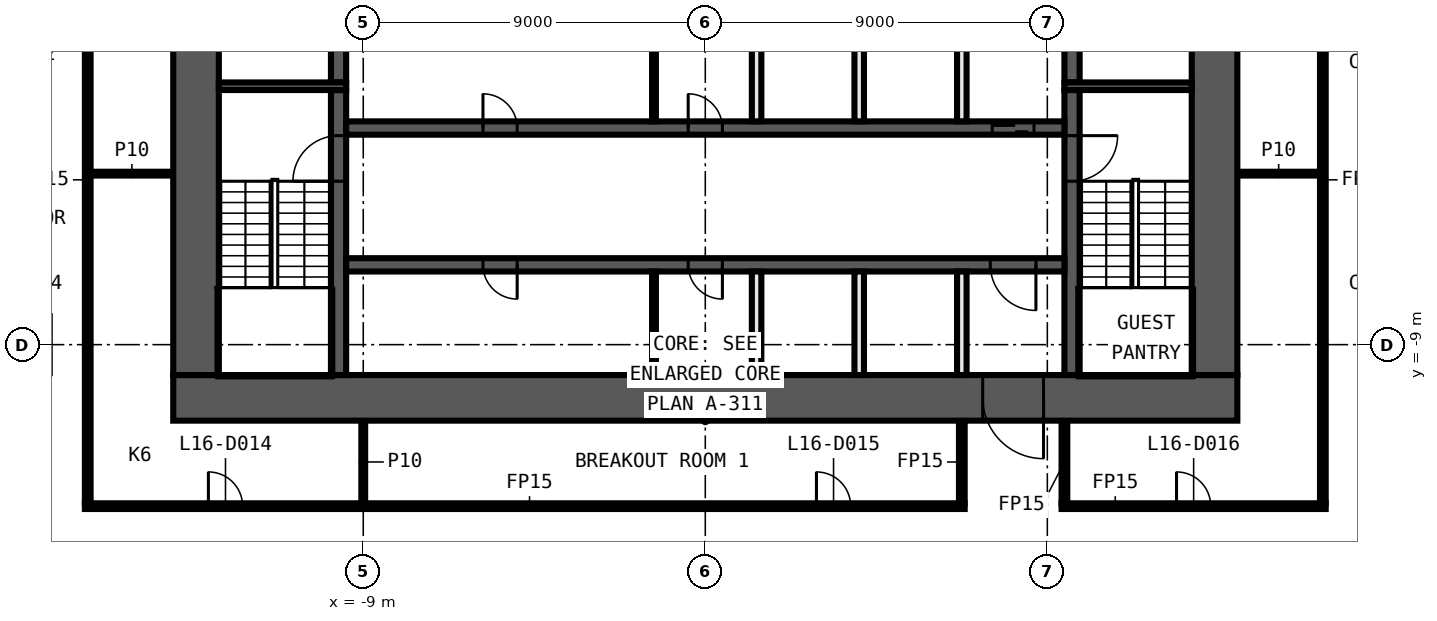
"""IFC4 building model, lengths in metres.
Left out: names, types, materials, properties, quantities, classifications, styles, units other than length and angle.
Written with IfcOpenShell. Run it as: python <this file> out.ifc"""

import sys

from ifc_helpers import new_model, si_unit, direction, frame, frame_2d, origin, place, context, subcontext, project, spatial, rectangle, extrude, element, fill, save


model = new_model("IFC4")
c1 = context("Model", 3, precision=1e-05, world=origin(), true_north=direction((0.0, 1.0)))
c2 = subcontext(c1, "Body", "Model", "MODEL_VIEW")
j1 = project(units=[si_unit("LENGTHUNIT", "METRE"), si_unit("PLANEANGLEUNIT", "RADIAN")], contexts=[c1])
p1 = place(None, origin())
s1 = spatial("IfcSite", under=j1, at=p1, CompositionType="ELEMENT")
p2 = place(p1, origin())
s2 = spatial("IfcBuilding", under=s1, at=p2, CompositionType="ELEMENT")
p3 = place(p2, frame((0.0, 0.0, 81.0)))
s3 = spatial("IfcBuildingStorey", under=s2, at=p3, CompositionType="ELEMENT", Elevation=81.0)
p4 = place(p3, frame((-16.325, -13.25, 0.0), z_axis=(0.0, 0.0, 1.0), x_axis=(1.0, 0.0, 0.0)))
e1 = element("IfcWall", 1, at=p4, inside=s3, PredefinedType="PARTITIONING", context=c2, shape_type="SweptSolid", body=[
    extrude(rectangle(XDim=23.15, YDim=0.15, at=frame_2d((11.575, 0.0))), origin(), (0.0, 0.0, 1.0), 3.3),
])
p5 = place(p4, frame((3.25, 0.0, 0.0)))
e2 = element("IfcOpeningElement", 2, at=p5, cuts=e1, PredefinedType="OPENING", context=c2, shape_type="SweptSolid", body=[
    extrude(rectangle(XDim=0.9, YDim=2.1, at=frame_2d((0.45, 1.05))), frame((0.0, 0.085, 0.0), z_axis=(0.0, -1.0, 0.0), x_axis=(1.0, 0.0, 0.0)), (0.0, 0.0, 1.0), 0.17),
])
p6 = place(p4, frame((19.25, 0.0, 0.0)))
e3 = element("IfcOpeningElement", 3, at=p6, cuts=e1, PredefinedType="OPENING", context=c2, shape_type="SweptSolid", body=[
    extrude(rectangle(XDim=0.9, YDim=2.1, at=frame_2d((0.45, 1.05))), frame((0.0, 0.085, 0.0), z_axis=(0.0, -1.0, 0.0), x_axis=(1.0, 0.0, 0.0)), (0.0, 0.0, 1.0), 0.17),
])
p7 = place(p3, frame((9.375, -13.25, 0.0), z_axis=(0.0, 0.0, 1.0), x_axis=(1.0, 0.0, 0.0)))
e4 = element("IfcWall", 4, at=p7, inside=s3, PredefinedType="PARTITIONING", context=c2, shape_type="SweptSolid", body=[
    extrude(rectangle(XDim=6.95, YDim=0.15, at=frame_2d((3.475, 0.0))), origin(), (0.0, 0.0, 1.0), 3.3),
])
p8 = place(p7, frame((3.025, 0.0, 0.0)))
e5 = element("IfcOpeningElement", 5, at=p8, cuts=e4, PredefinedType="OPENING", context=c2, shape_type="SweptSolid", body=[
    extrude(rectangle(XDim=0.9, YDim=2.1, at=frame_2d((0.45, 1.05))), frame((0.0, 0.085, 0.0), z_axis=(0.0, -1.0, 0.0), x_axis=(1.0, 0.0, 0.0)), (0.0, 0.0, 1.0), 0.17),
])
for number, where, z_axis, x_axis in (
    (6, (-16.175, -4.5, 0.0), (0.0, 0.0, 1.0), (1.0, 0.0, 0.0)),
    (7, (14.0, -4.5, 0.0), (0.0, 0.0, 1.0), (1.0, 0.0, 0.0)),
):
    element("IfcWall", number, at=place(p3, frame(where, z_axis=z_axis, x_axis=x_axis)), inside=s3, PredefinedType="PARTITIONING", context=c2, shape_type="SweptSolid", body=[
        extrude(rectangle(XDim=2.175, YDim=0.1, at=frame_2d((1.087, 0.0))), origin(), (0.0, 0.0, 1.0), 3.3),
    ])
p9 = place(p3, frame((16.25, -13.175, 0.0), z_axis=(0.0, 0.0, 1.0), x_axis=(0.0, 1.0, 0.0)))
e8 = element("IfcWall", 8, at=p9, inside=s3, PredefinedType="PARTITIONING", context=c2, shape_type="SweptSolid", body=[
    extrude(rectangle(XDim=26.35, YDim=0.15, at=frame_2d((13.175, 0.0))), origin(), (0.0, 0.0, 1.0), 3.3),
])
p10 = place(p9, frame((17.225, 0.0, 0.0)))
e9 = element("IfcOpeningElement", 9, at=p10, cuts=e8, PredefinedType="OPENING", context=c2, shape_type="SweptSolid", body=[
    extrude(rectangle(XDim=0.9, YDim=2.1, at=frame_2d((0.45, 1.05))), frame((0.0, 0.085, 0.0), z_axis=(0.0, -1.0, 0.0), x_axis=(1.0, 0.0, 0.0)), (0.0, 0.0, 1.0), 0.17),
])
for number, where, z_axis, x_axis in (
    (10, (9.45, -13.175, 0.0), (0.0, 0.0, 1.0), (0.0, 1.0, 0.0)),
    (11, (6.75, -13.175, 0.0), (0.0, 0.0, 1.0), (0.0, 1.0, 0.0)),
):
    element("IfcWall", number, at=place(p3, frame(where, z_axis=z_axis, x_axis=x_axis)), inside=s3, PredefinedType="PARTITIONING", context=c2, shape_type="SweptSolid", body=[
        extrude(rectangle(XDim=2.175, YDim=0.15, at=frame_2d((1.087, 0.0))), origin(), (0.0, 0.0, 1.0), 3.3),
    ])
p11 = place(p3, frame((-9.0, -13.175, 0.0), z_axis=(0.0, 0.0, 1.0), x_axis=(0.0, 1.0, 0.0)))
e12 = element("IfcWall", 12, at=p11, inside=s3, PredefinedType="PARTITIONING", context=c2, shape_type="SweptSolid", body=[
    extrude(rectangle(XDim=2.175, YDim=0.1, at=frame_2d((1.087, 0.0))), origin(), (0.0, 0.0, 1.0), 3.3),
])
p12 = place(p3, frame((-16.25, 13.175, 0.0), z_axis=(0.0, 0.0, 1.0), x_axis=(0.0, -1.0, 0.0)))
e13 = element("IfcWall", 13, at=p12, inside=s3, PredefinedType="PARTITIONING", context=c2, shape_type="SweptSolid", body=[
    extrude(rectangle(XDim=26.35, YDim=0.15, at=frame_2d((13.175, 0.0))), origin(), (0.0, 0.0, 1.0), 3.3),
])
p13 = place(p12, frame((8.225, 0.0, 0.0)))
e14 = element("IfcOpeningElement", 14, at=p13, cuts=e13, PredefinedType="OPENING", context=c2, shape_type="SweptSolid", body=[
    extrude(rectangle(XDim=0.9, YDim=2.1, at=frame_2d((0.45, 1.05))), frame((0.0, 0.085, 0.0), z_axis=(0.0, -1.0, 0.0), x_axis=(1.0, 0.0, 0.0)), (0.0, 0.0, 1.0), 0.17),
])
p14 = place(p3, frame((14.0, -10.4, 0.0), z_axis=(0.0, 0.0, 1.0), x_axis=(-1.0, 0.0, 0.0)))
e15 = element("IfcWall", 15, at=p14, inside=s3, PredefinedType="SHEAR", context=c2, shape_type="SweptSolid", body=[
    extrude(rectangle(XDim=28.0, YDim=1.2, at=frame_2d((14.0, 0.0))), origin(), (0.0, 0.0, 1.0), 3.3),
])
p15 = place(p14, frame((5.1, 0.0, 0.0)))
e16 = element("IfcOpeningElement", 16, at=p15, cuts=e15, PredefinedType="OPENING", context=c2, shape_type="SweptSolid", body=[
    extrude(rectangle(XDim=1.6, YDim=2.1, at=frame_2d((0.8, 1.05))), frame((0.0, 0.61, 0.0), z_axis=(0.0, -1.0, 0.0), x_axis=(1.0, 0.0, 0.0)), (0.0, 0.0, 1.0), 1.22),
])
for number, where, z_axis, x_axis in (
    (17, (13.4, 9.8, 0.0), (0.0, 0.0, 1.0), (0.0, -1.0, 0.0)),
    (18, (-13.4, -9.8, 0.0), (0.0, 0.0, 1.0), (0.0, 1.0, 0.0)),
):
    element("IfcWall", number, at=place(p3, frame(where, z_axis=z_axis, x_axis=x_axis)), inside=s3, PredefinedType="SHEAR", context=c2, shape_type="SweptSolid", body=[
        extrude(rectangle(XDim=19.6, YDim=1.2, at=frame_2d((9.8, 0.0))), origin(), (0.0, 0.0, 1.0), 3.3),
    ])
p16 = place(p3, frame((9.65, -2.3, 0.0), z_axis=(0.0, 0.0, 1.0), x_axis=(0.0, -1.0, 0.0)))
e19 = element("IfcWall", 19, at=p16, inside=s3, PredefinedType="SHEAR", context=c2, shape_type="SweptSolid", body=[
    extrude(rectangle(XDim=7.5, YDim=0.4, at=frame_2d((3.75, 0.0))), origin(), (0.0, 0.0, 1.0), 3.3),
])
p17 = place(p16, frame((1.2, 0.0, 0.0)))
e20 = element("IfcOpeningElement", 20, at=p17, cuts=e19, PredefinedType="OPENING", context=c2, shape_type="SweptSolid", body=[
    extrude(rectangle(XDim=1.2, YDim=2.1, at=frame_2d((0.6, 1.05))), frame((0.0, 0.21, 0.0), z_axis=(0.0, -1.0, 0.0), x_axis=(1.0, 0.0, 0.0)), (0.0, 0.0, 1.0), 0.42),
])
p18 = place(p3, frame((9.65, 2.1, 0.0), z_axis=(0.0, 0.0, 1.0), x_axis=(0.0, -1.0, 0.0)))
e21 = element("IfcWall", 21, at=p18, inside=s3, PredefinedType="SHEAR", context=c2, shape_type="SweptSolid", body=[
    extrude(rectangle(XDim=4.2, YDim=0.4, at=frame_2d((2.1, 0.0))), origin(), (0.0, 0.0, 1.0), 3.3),
])
p19 = place(p18, frame((0.15, 0.0, 0.0)))
e22 = element("IfcOpeningElement", 22, at=p19, cuts=e21, PredefinedType="OPENING", context=c2, shape_type="SweptSolid", body=[
    extrude(rectangle(XDim=0.9, YDim=2.1, at=frame_2d((0.45, 1.05))), frame((0.0, 0.21, 0.0), z_axis=(0.0, -1.0, 0.0), x_axis=(1.0, 0.0, 0.0)), (0.0, 0.0, 1.0), 0.42),
])
p20 = place(p3, frame((-9.65, -9.8, 0.0), z_axis=(0.0, 0.0, 1.0), x_axis=(0.0, 1.0, 0.0)))
e23 = element("IfcWall", 23, at=p20, inside=s3, PredefinedType="SHEAR", context=c2, shape_type="SweptSolid", body=[
    extrude(rectangle(XDim=7.5, YDim=0.4, at=frame_2d((3.75, 0.0))), origin(), (0.0, 0.0, 1.0), 3.3),
])
p21 = place(p20, frame((5.1, 0.0, 0.0)))
e24 = element("IfcOpeningElement", 24, at=p21, cuts=e23, PredefinedType="OPENING", context=c2, shape_type="SweptSolid", body=[
    extrude(rectangle(XDim=1.2, YDim=2.1, at=frame_2d((0.6, 1.05))), frame((0.0, 0.21, 0.0), z_axis=(0.0, -1.0, 0.0), x_axis=(1.0, 0.0, 0.0)), (0.0, 0.0, 1.0), 0.42),
])
p22 = place(p3, frame((-9.65, -2.1, 0.0), z_axis=(0.0, 0.0, 1.0), x_axis=(0.0, 1.0, 0.0)))
e25 = element("IfcWall", 25, at=p22, inside=s3, PredefinedType="SHEAR", context=c2, shape_type="SweptSolid", body=[
    extrude(rectangle(XDim=4.2, YDim=0.4, at=frame_2d((2.1, 0.0))), origin(), (0.0, 0.0, 1.0), 3.3),
])
for number, where, z_axis, x_axis in (
    (26, (9.45, -2.2, 0.0), (0.0, 0.0, 1.0), (1.0, 0.0, 0.0)),
    (27, (-9.45, -2.2, 0.0), (0.0, 0.0, 1.0), (-1.0, 0.0, 0.0)),
):
    element("IfcWall", number, at=place(p3, frame(where, z_axis=z_axis, x_axis=x_axis)), inside=s3, PredefinedType="SHEAR", context=c2, shape_type="SweptSolid", body=[
        extrude(rectangle(XDim=3.35, YDim=0.2, at=frame_2d((1.675, 0.0))), origin(), (0.0, 0.0, 1.0), 3.3),
    ])
p23 = place(p3, frame((-9.45, -3.3, 0.0), z_axis=(0.0, 0.0, 1.0), x_axis=(1.0, 0.0, 0.0)))
e28 = element("IfcWall", 28, at=p23, inside=s3, PredefinedType="SHEAR", context=c2, shape_type="SweptSolid", body=[
    extrude(rectangle(XDim=18.9, YDim=0.35, at=frame_2d((9.45, 0.0))), origin(), (0.0, 0.0, 1.0), 3.3),
])
p24 = place(p23, frame((17.0, 0.0, 0.0)))
e29 = element("IfcOpeningElement", 29, at=p24, cuts=e28, PredefinedType="OPENING", context=c2, shape_type="SweptSolid", body=[
    extrude(rectangle(XDim=1.1, YDim=2.1, at=frame_2d((0.55, 1.05))), frame((0.0, 0.185, 0.0), z_axis=(0.0, -1.0, 0.0), x_axis=(1.0, 0.0, 0.0)), (0.0, 0.0, 1.0), 0.37),
])
p25 = place(p23, frame((3.6, 0.0, 0.0)))
e30 = element("IfcOpeningElement", 30, at=p25, cuts=e28, PredefinedType="OPENING", context=c2, shape_type="SweptSolid", body=[
    extrude(rectangle(XDim=0.9, YDim=2.1, at=frame_2d((0.45, 1.05))), frame((0.0, 0.185, 0.0), z_axis=(0.0, -1.0, 0.0), x_axis=(1.0, 0.0, 0.0)), (0.0, 0.0, 1.0), 0.37),
])
p26 = place(p23, frame((9.0, 0.0, 0.0)))
e31 = element("IfcOpeningElement", 31, at=p26, cuts=e28, PredefinedType="OPENING", context=c2, shape_type="SweptSolid", body=[
    extrude(rectangle(XDim=0.9, YDim=2.1, at=frame_2d((0.45, 1.05))), frame((0.0, 0.185, 0.0), z_axis=(0.0, -1.0, 0.0), x_axis=(1.0, 0.0, 0.0)), (0.0, 0.0, 1.0), 0.37),
])
p27 = place(p3, frame((9.45, -6.9, 0.0), z_axis=(0.0, 0.0, 1.0), x_axis=(-1.0, 0.0, 0.0)))
e32 = element("IfcWall", 32, at=p27, inside=s3, PredefinedType="SHEAR", context=c2, shape_type="SweptSolid", body=[
    extrude(rectangle(XDim=18.9, YDim=0.35, at=frame_2d((9.45, 0.0))), origin(), (0.0, 0.0, 1.0), 3.3),
])
p28 = place(p27, frame((0.75, 0.0, 0.0)))
e33 = element("IfcOpeningElement", 33, at=p28, cuts=e32, PredefinedType="OPENING", context=c2, shape_type="SweptSolid", body=[
    extrude(rectangle(XDim=1.2, YDim=2.1, at=frame_2d((0.6, 1.05))), frame((0.0, 0.185, 0.0), z_axis=(0.0, -1.0, 0.0), x_axis=(1.0, 0.0, 0.0)), (0.0, 0.0, 1.0), 0.37),
])
p29 = place(p27, frame((14.4, 0.0, 0.0)))
e34 = element("IfcOpeningElement", 34, at=p29, cuts=e32, PredefinedType="OPENING", context=c2, shape_type="SweptSolid", body=[
    extrude(rectangle(XDim=0.9, YDim=2.1, at=frame_2d((0.45, 1.05))), frame((0.0, 0.185, 0.0), z_axis=(0.0, -1.0, 0.0), x_axis=(1.0, 0.0, 0.0)), (0.0, 0.0, 1.0), 0.37),
])
p30 = place(p27, frame((9.0, 0.0, 0.0)))
e35 = element("IfcOpeningElement", 35, at=p30, cuts=e32, PredefinedType="OPENING", context=c2, shape_type="SweptSolid", body=[
    extrude(rectangle(XDim=0.9, YDim=2.1, at=frame_2d((0.45, 1.05))), frame((0.0, 0.185, 0.0), z_axis=(0.0, -1.0, 0.0), x_axis=(1.0, 0.0, 0.0)), (0.0, 0.0, 1.0), 0.37),
])
for number, where, z_axis, x_axis in (
    (36, (6.75, -9.8, 0.0), (0.0, 0.0, 1.0), (0.0, 1.0, 0.0)),
    (37, (6.75, -3.125, 0.0), (0.0, 0.0, 1.0), (0.0, 1.0, 0.0)),
    (38, (4.05, -9.8, 0.0), (0.0, 0.0, 1.0), (0.0, 1.0, 0.0)),
    (39, (4.05, -3.125, 0.0), (0.0, 0.0, 1.0), (0.0, 1.0, 0.0)),
    (40, (1.35, -9.8, 0.0), (0.0, 0.0, 1.0), (0.0, 1.0, 0.0)),
    (41, (1.35, -3.125, 0.0), (0.0, 0.0, 1.0), (0.0, 1.0, 0.0)),
):
    element("IfcWall", number, at=place(p3, frame(where, z_axis=z_axis, x_axis=x_axis)), inside=s3, PredefinedType="SOLIDWALL", context=c2, shape_type="SweptSolid", body=[
        extrude(rectangle(XDim=2.725, YDim=0.25, at=frame_2d((1.363, 0.0))), origin(), (0.0, 0.0, 1.0), 3.3),
    ])
for number, where, z_axis, x_axis in (
    (42, (-1.35, -9.8, 0.0), (0.0, 0.0, 1.0), (0.0, 1.0, 0.0)),
    (43, (-1.35, -3.125, 0.0), (0.0, 0.0, 1.0), (0.0, 1.0, 0.0)),
):
    element("IfcWall", number, at=place(p3, frame(where, z_axis=z_axis, x_axis=x_axis)), inside=s3, PredefinedType="PARTITIONING", context=c2, shape_type="SweptSolid", body=[
        extrude(rectangle(XDim=2.725, YDim=0.1, at=frame_2d((1.363, 0.0))), origin(), (0.0, 0.0, 1.0), 3.3),
    ])
p31 = place(p5, origin())
e44 = element("IfcDoor", 44, at=p31, inside=s3, OperationType="SINGLE_SWING_RIGHT", PredefinedType="DOOR", context=c2, shape_type="SweptSolid", body=[
    extrude(rectangle(XDim=0.9, YDim=2.1, at=frame_2d((0.45, 1.05))), frame((0.0, 0.025, 0.0), z_axis=(0.0, -1.0, 0.0), x_axis=(1.0, 0.0, 0.0)), (0.0, 0.0, 1.0), 0.05),
])
fill(e2, e44)
p32 = place(p6, origin())
e45 = element("IfcDoor", 45, at=p32, inside=s3, OperationType="SINGLE_SWING_LEFT", PredefinedType="DOOR", context=c2, shape_type="SweptSolid", body=[
    extrude(rectangle(XDim=0.9, YDim=2.1, at=frame_2d((0.45, 1.05))), frame((0.0, 0.025, 0.0), z_axis=(0.0, -1.0, 0.0), x_axis=(1.0, 0.0, 0.0)), (0.0, 0.0, 1.0), 0.05),
])
fill(e3, e45)
p33 = place(p8, origin())
e46 = element("IfcDoor", 46, at=p33, inside=s3, OperationType="SINGLE_SWING_RIGHT", PredefinedType="DOOR", context=c2, shape_type="SweptSolid", body=[
    extrude(rectangle(XDim=0.9, YDim=2.1, at=frame_2d((0.45, 1.05))), frame((0.0, 0.025, 0.0), z_axis=(0.0, -1.0, 0.0), x_axis=(1.0, 0.0, 0.0)), (0.0, 0.0, 1.0), 0.05),
])
fill(e5, e46)
p34 = place(p24, origin())
e47 = element("IfcDoor", 47, at=p34, inside=s3, OperationType="DOUBLE_DOOR_SLIDING", PredefinedType="DOOR", context=c2, shape_type="SweptSolid", body=[
    extrude(rectangle(XDim=1.1, YDim=2.1, at=frame_2d((0.55, 1.05))), frame((0.0, 0.025, 0.0), z_axis=(0.0, -1.0, 0.0), x_axis=(1.0, 0.0, 0.0)), (0.0, 0.0, 1.0), 0.05),
])
fill(e29, e47)
p35 = place(p15, origin())
e48 = element("IfcDoor", 48, at=p35, inside=s3, OperationType="DOUBLE_DOOR_SINGLE_SWING", PredefinedType="DOOR", context=c2, shape_type="SweptSolid", body=[
    extrude(rectangle(XDim=1.6, YDim=2.1, at=frame_2d((0.8, 1.05))), frame((0.0, 0.025, 0.0), z_axis=(0.0, -1.0, 0.0), x_axis=(1.0, 0.0, 0.0)), (0.0, 0.0, 1.0), 0.05),
])
fill(e16, e48)
p36 = place(p28, origin())
e49 = element("IfcDoor", 49, at=p36, inside=s3, OperationType="SINGLE_SWING_LEFT", PredefinedType="DOOR", context=c2, shape_type="SweptSolid", body=[
    extrude(rectangle(XDim=1.2, YDim=2.1, at=frame_2d((0.6, 1.05))), frame((0.0, 0.025, 0.0), z_axis=(0.0, -1.0, 0.0), x_axis=(1.0, 0.0, 0.0)), (0.0, 0.0, 1.0), 0.05),
])
fill(e33, e49)
p37 = place(p25, origin())
e50 = element("IfcDoor", 50, at=p37, inside=s3, OperationType="SINGLE_SWING_RIGHT", PredefinedType="DOOR", context=c2, shape_type="SweptSolid", body=[
    extrude(rectangle(XDim=0.9, YDim=2.1, at=frame_2d((0.45, 1.05))), frame((0.0, 0.025, 0.0), z_axis=(0.0, -1.0, 0.0), x_axis=(1.0, 0.0, 0.0)), (0.0, 0.0, 1.0), 0.05),
])
fill(e30, e50)
p38 = place(p26, origin())
e51 = element("IfcDoor", 51, at=p38, inside=s3, OperationType="SINGLE_SWING_LEFT", PredefinedType="DOOR", context=c2, shape_type="SweptSolid", body=[
    extrude(rectangle(XDim=0.9, YDim=2.1, at=frame_2d((0.45, 1.05))), frame((0.0, 0.025, 0.0), z_axis=(0.0, -1.0, 0.0), x_axis=(1.0, 0.0, 0.0)), (0.0, 0.0, 1.0), 0.05),
])
fill(e31, e51)
p39 = place(p29, origin())
e52 = element("IfcDoor", 52, at=p39, inside=s3, OperationType="SINGLE_SWING_RIGHT", PredefinedType="DOOR", context=c2, shape_type="SweptSolid", body=[
    extrude(rectangle(XDim=0.9, YDim=2.1, at=frame_2d((0.45, 1.05))), frame((0.0, 0.025, 0.0), z_axis=(0.0, -1.0, 0.0), x_axis=(1.0, 0.0, 0.0)), (0.0, 0.0, 1.0), 0.05),
])
fill(e34, e52)
p40 = place(p30, origin())
e53 = element("IfcDoor", 53, at=p40, inside=s3, OperationType="SINGLE_SWING_LEFT", PredefinedType="DOOR", context=c2, shape_type="SweptSolid", body=[
    extrude(rectangle(XDim=0.9, YDim=2.1, at=frame_2d((0.45, 1.05))), frame((0.0, 0.025, 0.0), z_axis=(0.0, -1.0, 0.0), x_axis=(1.0, 0.0, 0.0)), (0.0, 0.0, 1.0), 0.05),
])
fill(e35, e53)
p41 = place(p17, origin())
e54 = element("IfcDoor", 54, at=p41, inside=s3, OperationType="SINGLE_SWING_RIGHT", PredefinedType="DOOR", context=c2, shape_type="SweptSolid", body=[
    extrude(rectangle(XDim=1.2, YDim=2.1, at=frame_2d((0.6, 1.05))), frame((0.0, 0.025, 0.0), z_axis=(0.0, -1.0, 0.0), x_axis=(1.0, 0.0, 0.0)), (0.0, 0.0, 1.0), 0.05),
])
fill(e20, e54)
p42 = place(p21, origin())
e55 = element("IfcDoor", 55, at=p42, inside=s3, OperationType="SINGLE_SWING_LEFT", PredefinedType="DOOR", context=c2, shape_type="SweptSolid", body=[
    extrude(rectangle(XDim=1.2, YDim=2.1, at=frame_2d((0.6, 1.05))), frame((0.0, 0.025, 0.0), z_axis=(0.0, -1.0, 0.0), x_axis=(1.0, 0.0, 0.0)), (0.0, 0.0, 1.0), 0.05),
])
fill(e24, e55)
save(model, sys.argv[1])
